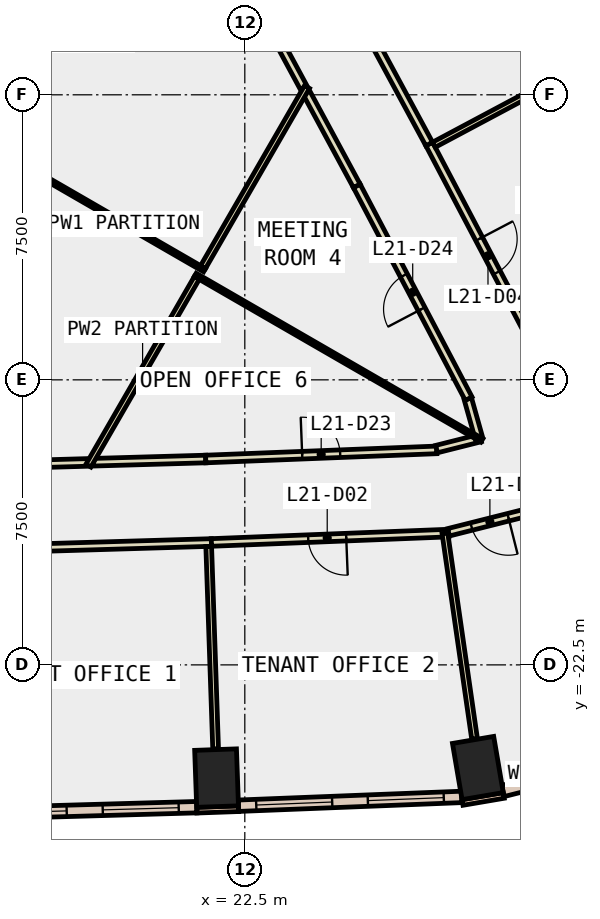
"""IFC4 building model, lengths in metres.
Left out: names, types, materials, properties, quantities, classifications, styles, units other than length and angle.
Written with IfcOpenShell. Run it as: python <this file> out.ifc"""

import sys

from ifc_helpers import new_model, si_unit, direction, frame, frame_2d, origin, origin_2d, place, context, subcontext, project, spatial, rectangle, extrude, element, fill, save


model = new_model("IFC4")
c1 = context("Model", 3, precision=1e-05, world=origin(), true_north=direction((0.0, 1.0)))
c2 = subcontext(c1, "Body", "Model", "MODEL_VIEW")
j1 = project(units=[si_unit("LENGTHUNIT", "METRE"), si_unit("PLANEANGLEUNIT", "RADIAN")], contexts=[c1])
p1 = place(None, origin())
s1 = spatial("IfcSite", under=j1, at=p1, CompositionType="ELEMENT")
p2 = place(p1, origin())
s2 = spatial("IfcBuilding", under=s1, at=p2, CompositionType="ELEMENT")
p3 = place(p2, frame((0.0, 0.0, 99.2)))
s3 = spatial("IfcBuildingStorey", under=s2, at=p3, CompositionType="ELEMENT", Elevation=99.2)
for number, where, z_axis, x_axis in (
    (1, (21.757, -25.479, -0.4), (0.0, 0.0, 1.0), (0.999, 0.035, 0.0)),
    (2, (28.633, -25.214, -0.4), (0.0, 0.0, 1.0), (0.986, 0.168, 0.0)),
):
    element("IfcColumn", number, at=place(p3, frame(where, z_axis=z_axis, x_axis=x_axis)), inside=s3, PredefinedType="COLUMN", context=c2, shape_type="SweptSolid", body=[
        extrude(rectangle(XDim=1.1, YDim=1.5, at=origin_2d()), origin(), (0.0, 0.0, 1.0), 4.2),
    ])
p4 = place(p3, frame((21.237, -26.323, 0.0), z_axis=(0.0, 0.0, 1.0), x_axis=(0.999368780235, 0.035525217693, 0.0)))
e3 = element("IfcWall", 3, at=p4, inside=s3, PredefinedType="STANDARD", context=c2, shape_type="SweptSolid", body=[
    extrude(rectangle(XDim=1.1, YDim=0.15, at=frame_2d((0.55, 0.0))), origin(), (0.0, 0.0, 1.0), 3.8),
])
p5 = place(p3, frame((28.229, -26.12, 0.0), z_axis=(0.0, 0.0, 1.0), x_axis=(0.985763338892, 0.168138751323, 0.0)))
e4 = element("IfcWall", 4, at=p5, inside=s3, PredefinedType="STANDARD", context=c2, shape_type="SweptSolid", body=[
    extrude(rectangle(XDim=1.101, YDim=0.15, at=frame_2d((0.55, 0.0))), origin(), (0.0, 0.0, 1.0), 3.8),
])
p6 = place(p3, frame((15.34, -26.413, 0.0), z_axis=(0.0, 0.0, 1.0), x_axis=(0.999588397616, 0.028688592709, 0.0)))
e5 = element("IfcWall", 5, at=p6, inside=s3, PredefinedType="STANDARD", context=c2, shape_type="SweptSolid", body=[
    extrude(rectangle(XDim=5.897, YDim=0.3, at=frame_2d((2.949, 0.0))), origin(), (0.0, 0.0, 1.0), 3.8),
])
p7 = place(p6, frame((0.474, 0.0, 0.9)))
e6 = element("IfcOpeningElement", 6, at=p7, cuts=e5, PredefinedType="OPENING", context=c2, shape_type="SweptSolid", body=[
    extrude(rectangle(XDim=2.0, YDim=2.6, at=frame_2d((1.0, 1.3))), frame((0.0, 0.16, 0.0), z_axis=(0.0, -1.0, 0.0), x_axis=(1.0, 0.0, 0.0)), (0.0, 0.0, 1.0), 0.32),
])
p8 = place(p6, frame((3.423, 0.0, 0.9)))
e7 = element("IfcOpeningElement", 7, at=p8, cuts=e5, PredefinedType="OPENING", context=c2, shape_type="SweptSolid", body=[
    extrude(rectangle(XDim=2.0, YDim=2.6, at=frame_2d((1.0, 1.3))), frame((0.0, 0.16, 0.0), z_axis=(0.0, -1.0, 0.0), x_axis=(1.0, 0.0, 0.0)), (0.0, 0.0, 1.0), 0.32),
])
p9 = place(p3, frame((22.332, -26.206, 0.0), z_axis=(0.0, 0.0, 1.0), x_axis=(0.99922113396, 0.039460428885, 0.0)))
e8 = element("IfcWall", 8, at=p9, inside=s3, PredefinedType="STANDARD", context=c2, shape_type="SweptSolid", body=[
    extrude(rectangle(XDim=5.878, YDim=0.3, at=frame_2d((2.939, 0.0))), origin(), (0.0, 0.0, 1.0), 3.8),
])
p10 = place(p9, frame((0.469, 0.0, 0.9)))
e9 = element("IfcOpeningElement", 9, at=p10, cuts=e8, PredefinedType="OPENING", context=c2, shape_type="SweptSolid", body=[
    extrude(rectangle(XDim=2.0, YDim=2.6, at=frame_2d((1.0, 1.3))), frame((0.0, 0.16, 0.0), z_axis=(0.0, -1.0, 0.0), x_axis=(1.0, 0.0, 0.0)), (0.0, 0.0, 1.0), 0.32),
])
p11 = place(p9, frame((3.408, 0.0, 0.9)))
e10 = element("IfcOpeningElement", 10, at=p11, cuts=e8, PredefinedType="OPENING", context=c2, shape_type="SweptSolid", body=[
    extrude(rectangle(XDim=2.0, YDim=2.6, at=frame_2d((1.0, 1.3))), frame((0.0, 0.16, 0.0), z_axis=(0.0, -1.0, 0.0), x_axis=(1.0, 0.0, 0.0)), (0.0, 0.0, 1.0), 0.32),
])
p12 = place(p3, frame((29.293, -25.818, 0.0), z_axis=(0.0, 0.0, 1.0), x_axis=(0.969658938481, 0.244461741432, 0.0)))
e11 = element("IfcWall", 11, at=p12, inside=s3, PredefinedType="STANDARD", context=c2, shape_type="SweptSolid", body=[
    extrude(rectangle(XDim=3.727, YDim=0.3, at=frame_2d((1.864, 0.0))), origin(), (0.0, 0.0, 1.0), 3.8),
])
p13 = place(p12, frame((1.164, 0.0, 0.9)))
e12 = element("IfcOpeningElement", 12, at=p13, cuts=e11, PredefinedType="OPENING", context=c2, shape_type="SweptSolid", body=[
    extrude(rectangle(XDim=1.4, YDim=2.6, at=frame_2d((0.7, 1.3))), frame((0.0, 0.16, 0.0), z_axis=(0.0, -1.0, 0.0), x_axis=(1.0, 0.0, 0.0)), (0.0, 0.0, 1.0), 0.32),
])
p14 = place(p3, frame((14.519, -17.283, 0.0), z_axis=(0.0, 0.0, 1.0), x_axis=(0.999591204998, 0.028590608419, 0.0)))
e13 = element("IfcWall", 13, at=p14, inside=s3, PredefinedType="PARTITIONING", context=c2, shape_type="SweptSolid", body=[
    extrude(rectangle(XDim=3.843, YDim=0.2, at=frame_2d((1.921, 0.0))), origin(), (0.0, 0.0, 1.0), 3.8),
])
p15 = place(p3, frame((24.051, -7.315, 0.0), z_axis=(0.0, 0.0, 1.0), x_axis=(-0.475308630647, 0.87981913234, 0.0)))
e14 = element("IfcWall", 14, at=p15, inside=s3, PredefinedType="PARTITIONING", context=c2, shape_type="SweptSolid", body=[
    extrude(rectangle(XDim=4.166, YDim=0.2, at=frame_2d((2.083, 0.0))), origin(), (0.0, 0.0, 1.0), 3.8),
])
p16 = place(p3, frame((18.509, -17.168, 0.0), z_axis=(0.0, 0.0, 1.0), x_axis=(0.999588854267, 0.028672677323, 0.0)))
e15 = element("IfcWall", 15, at=p16, inside=s3, PredefinedType="PARTITIONING", context=c2, shape_type="SweptSolid", body=[
    extrude(rectangle(XDim=2.963, YDim=0.2, at=frame_2d((1.481, 0.0))), origin(), (0.0, 0.0, 1.0), 3.8),
])
p17 = place(p3, frame((21.471, -17.083, 0.0), z_axis=(0.0, 0.0, 1.0), x_axis=(0.999221407079, 0.039453512338, 0.0)))
e16 = element("IfcWall", 16, at=p17, inside=s3, PredefinedType="PARTITIONING", context=c2, shape_type="SweptSolid", body=[
    extrude(rectangle(XDim=6.083, YDim=0.2, at=frame_2d((3.042, 0.0))), origin(), (0.0, 0.0, 1.0), 3.8),
])
p18 = place(p17, frame((2.541, 0.0, 0.0)))
e17 = element("IfcOpeningElement", 17, at=p18, cuts=e16, PredefinedType="OPENING", context=c2, shape_type="SweptSolid", body=[
    extrude(rectangle(XDim=1.0, YDim=2.1, at=frame_2d((0.5, 1.05))), frame((0.0, 0.11, 0.0), z_axis=(0.0, -1.0, 0.0), x_axis=(1.0, 0.0, 0.0)), (0.0, 0.0, 1.0), 0.22),
])
p19 = place(p3, frame((27.546, -16.822, 0.0), z_axis=(0.0, 0.0, 1.0), x_axis=(0.969694756333, 0.244319625777, 0.0)))
e18 = element("IfcWall", 18, at=p19, inside=s3, PredefinedType="PARTITIONING", context=c2, shape_type="SweptSolid", body=[
    extrude(rectangle(XDim=1.191, YDim=0.2, at=frame_2d((0.596, 0.0))), origin(), (0.0, 0.0, 1.0), 3.8),
])
p20 = place(p3, frame((28.662, -16.541, 0.0), z_axis=(0.0, 0.0, 1.0), x_axis=(-0.270771802087, 0.96264356394, 0.0)))
e19 = element("IfcWall", 19, at=p20, inside=s3, PredefinedType="PARTITIONING", context=c2, shape_type="SweptSolid", body=[
    extrude(rectangle(XDim=1.078, YDim=0.2, at=frame_2d((0.539, 0.0))), origin(), (0.0, 0.0, 1.0), 3.8),
])
p21 = place(p3, frame((28.39, -15.495, 0.0), z_axis=(0.0, 0.0, 1.0), x_axis=(-0.465367816287, 0.885117390838, 0.0)))
e20 = element("IfcWall", 20, at=p21, inside=s3, PredefinedType="PARTITIONING", context=c2, shape_type="SweptSolid", body=[
    extrude(rectangle(XDim=6.326, YDim=0.2, at=frame_2d((3.163, 0.0))), origin(), (0.0, 0.0, 1.0), 3.8),
])
p22 = place(p21, frame((2.663, 0.0, 0.0)))
e21 = element("IfcOpeningElement", 21, at=p22, cuts=e20, PredefinedType="OPENING", context=c2, shape_type="SweptSolid", body=[
    extrude(rectangle(XDim=1.0, YDim=2.1, at=frame_2d((0.5, 1.05))), frame((0.0, 0.11, 0.0), z_axis=(0.0, -1.0, 0.0), x_axis=(1.0, 0.0, 0.0)), (0.0, 0.0, 1.0), 0.22),
])
p23 = place(p3, frame((25.446, -9.896, 0.0), z_axis=(0.0, 0.0, 1.0), x_axis=(-0.475427182652, 0.879755076141, 0.0)))
e22 = element("IfcWall", 22, at=p23, inside=s3, PredefinedType="PARTITIONING", context=c2, shape_type="SweptSolid", body=[
    extrude(rectangle(XDim=2.785, YDim=0.2, at=frame_2d((1.393, 0.0))), origin(), (0.0, 0.0, 1.0), 3.8),
])
p24 = place(p3, frame((21.621, -19.28, 0.0), z_axis=(0.0, 0.0, 1.0), x_axis=(-0.999557957525, -0.029730280001, 0.0)))
e23 = element("IfcWall", 23, at=p24, inside=s3, PredefinedType="PARTITIONING", context=c2, shape_type="SweptSolid", body=[
    extrude(rectangle(XDim=13.927, YDim=0.2, at=frame_2d((6.964, 0.0))), origin(), (0.0, 0.0, 1.0), 3.8),
])
p25 = place(p24, frame((6.464, 0.0, 0.0)))
e24 = element("IfcOpeningElement", 24, at=p25, cuts=e23, PredefinedType="OPENING", context=c2, shape_type="SweptSolid", body=[
    extrude(rectangle(XDim=1.0, YDim=2.1, at=frame_2d((0.5, 1.05))), frame((0.0, 0.11, 0.0), z_axis=(0.0, -1.0, 0.0), x_axis=(1.0, 0.0, 0.0)), (0.0, 0.0, 1.0), 0.22),
])
p26 = place(p3, frame((27.865, -19.032, 0.0), z_axis=(0.0, 0.0, 1.0), x_axis=(-0.999218029978, -0.039538950003, 0.0)))
e25 = element("IfcWall", 25, at=p26, inside=s3, PredefinedType="PARTITIONING", context=c2, shape_type="SweptSolid", body=[
    extrude(rectangle(XDim=6.249, YDim=0.2, at=frame_2d((3.125, 0.0))), origin(), (0.0, 0.0, 1.0), 3.8),
])
p27 = place(p26, frame((2.699, 0.0, 0.0)))
e26 = element("IfcOpeningElement", 26, at=p27, cuts=e25, PredefinedType="OPENING", context=c2, shape_type="SweptSolid", body=[
    extrude(rectangle(XDim=1.0, YDim=2.1, at=frame_2d((0.5, 1.05))), frame((0.0, 0.11, 0.0), z_axis=(0.0, -1.0, 0.0), x_axis=(1.0, 0.0, 0.0)), (0.0, 0.0, 1.0), 0.22),
])
p28 = place(p3, frame((30.037, -18.463, 0.0), z_axis=(0.0, 0.0, 1.0), x_axis=(-0.969686214682, -0.244353524746, 0.0)))
e27 = element("IfcWall", 27, at=p28, inside=s3, PredefinedType="PARTITIONING", context=c2, shape_type="SweptSolid", body=[
    extrude(rectangle(XDim=2.243, YDim=0.2, at=frame_2d((1.122, 0.0))), origin(), (0.0, 0.0, 1.0), 3.8),
])
p29 = place(p28, frame((0.622, 0.0, 0.0)))
e28 = element("IfcOpeningElement", 28, at=p29, cuts=e27, PredefinedType="OPENING", context=c2, shape_type="SweptSolid", body=[
    extrude(rectangle(XDim=1.0, YDim=2.1, at=frame_2d((0.5, 1.05))), frame((0.0, 0.11, 0.0), z_axis=(0.0, -1.0, 0.0), x_axis=(1.0, 0.0, 0.0)), (0.0, 0.0, 1.0), 0.22),
])
p30 = place(p3, frame((27.353, -8.794, 0.0), z_axis=(0.0, 0.0, 1.0), x_axis=(0.465239168813, -0.885185017836, 0.0)))
e29 = element("IfcWall", 29, at=p30, inside=s3, PredefinedType="PARTITIONING", context=c2, shape_type="SweptSolid", body=[
    extrude(rectangle(XDim=6.646, YDim=0.2, at=frame_2d((3.323, 0.0))), origin(), (0.0, 0.0, 1.0), 3.8),
])
p31 = place(p30, frame((2.823, 0.0, 0.0)))
e30 = element("IfcOpeningElement", 30, at=p31, cuts=e29, PredefinedType="OPENING", context=c2, shape_type="SweptSolid", body=[
    extrude(rectangle(XDim=1.0, YDim=2.1, at=frame_2d((0.5, 1.05))), frame((0.0, 0.11, 0.0), z_axis=(0.0, -1.0, 0.0), x_axis=(1.0, 0.0, 0.0)), (0.0, 0.0, 1.0), 0.22),
])
p32 = place(p3, frame((24.0, -2.593, 0.0), z_axis=(0.0, 0.0, 1.0), x_axis=(0.475480817472, -0.879726089312, 0.0)))
e31 = element("IfcWall", 31, at=p32, inside=s3, PredefinedType="PARTITIONING", context=c2, shape_type="SweptSolid", body=[
    extrude(rectangle(XDim=7.05, YDim=0.2, at=frame_2d((3.525, 0.0))), origin(), (0.0, 0.0, 1.0), 3.8),
])
p33 = place(p32, frame((3.1, 0.0, 0.0)))
e32 = element("IfcOpeningElement", 32, at=p33, cuts=e31, PredefinedType="OPENING", context=c2, shape_type="SweptSolid", body=[
    extrude(rectangle(XDim=1.0, YDim=2.1, at=frame_2d((0.5, 1.05))), frame((0.0, 0.11, 0.0), z_axis=(0.0, -1.0, 0.0), x_axis=(1.0, 0.0, 0.0)), (0.0, 0.0, 1.0), 0.22),
])
p34 = place(p3, frame((18.503, 2.949, 0.0), z_axis=(0.0, 0.0, 1.0), x_axis=(-0.49997390151, -0.86604047123, 0.0)))
e33 = element("IfcWall", 33, at=p34, inside=s3, PredefinedType="PARTITIONING", context=c2, shape_type="SweptSolid", body=[
    extrude(rectangle(XDim=11.626, YDim=0.2, at=frame_2d((5.813, 0.0))), origin(), (0.0, 0.0, 1.0), 3.8),
])
p35 = place(p3, frame((17.219, -9.676, 0.0), z_axis=(0.0, 0.0, 1.0), x_axis=(0.86598459596, -0.500070674565, 0.0)))
e34 = element("IfcWall", 34, at=p35, inside=s3, PredefinedType="PARTITIONING", context=c2, shape_type="SweptSolid", body=[
    extrude(rectangle(XDim=4.875, YDim=0.1, at=frame_2d((2.438, 0.0))), origin(), (0.0, 0.0, 1.0), 3.8),
])
p36 = place(p3, frame((21.236, -12.319, 0.0), z_axis=(0.0, 0.0, 1.0), x_axis=(-0.500016488359, -0.866015884017, 0.0)))
e35 = element("IfcWall", 35, at=p36, inside=s3, PredefinedType="PARTITIONING", context=c2, shape_type="SweptSolid", body=[
    extrude(rectangle(XDim=5.702, YDim=0.15, at=frame_2d((2.851, 0.0))), origin(), (0.0, 0.0, 1.0), 3.8),
])
p37 = place(p3, frame((24.137, -7.294, 0.0), z_axis=(0.0, 0.0, 1.0), x_axis=(-0.500001804394, -0.866024362014, 0.0)))
e36 = element("IfcWall", 36, at=p37, inside=s3, PredefinedType="PARTITIONING", context=c2, shape_type="SweptSolid", body=[
    extrude(rectangle(XDim=5.472, YDim=0.15, at=frame_2d((2.736, 0.0))), origin(), (0.0, 0.0, 1.0), 3.8),
])
p38 = place(p3, frame((21.196, -12.238, 0.0), z_axis=(0.0, 0.0, 1.0), x_axis=(0.866023145199, -0.500003911965, 0.0)))
e37 = element("IfcWall", 37, at=p38, inside=s3, PredefinedType="PARTITIONING", context=c2, shape_type="SweptSolid", body=[
    extrude(rectangle(XDim=8.71, YDim=0.1, at=frame_2d((4.355, 0.0))), origin(), (0.0, 0.0, 1.0), 3.8),
])
p39 = place(p3, frame((21.55, -19.382, 0.0), z_axis=(0.0, 0.0, 1.0), x_axis=(0.034124666577, -0.999417583961, 0.0)))
e38 = element("IfcWall", 38, at=p39, inside=s3, PredefinedType="PARTITIONING", context=c2, shape_type="SweptSolid", body=[
    extrude(rectangle(XDim=5.33, YDim=0.15, at=frame_2d((2.665, 0.0))), origin(), (0.0, 0.0, 1.0), 3.8),
])
p40 = place(p3, frame((27.765, -19.036, 0.0), z_axis=(0.0, 0.0, 1.0), x_axis=(0.142827612329, -0.989747580526, 0.0)))
e39 = element("IfcWall", 39, at=p40, inside=s3, PredefinedType="PARTITIONING", context=c2, shape_type="SweptSolid", body=[
    extrude(rectangle(XDim=5.468, YDim=0.15, at=frame_2d((2.734, 0.0))), origin(), (0.0, 0.0, 1.0), 3.8),
])
p41 = place(p3, frame((27.476, -8.814, 0.0), z_axis=(0.0, 0.0, 1.0), x_axis=(0.882440424847, 0.47042416668, 0.0)))
e40 = element("IfcWall", 40, at=p41, inside=s3, PredefinedType="PARTITIONING", context=c2, shape_type="SweptSolid", body=[
    extrude(rectangle(XDim=5.329, YDim=0.15, at=frame_2d((2.665, 0.0))), origin(), (0.0, 0.0, 1.0), 3.8),
])
p42 = place(p7, origin())
e41 = element("IfcWindow", 41, at=p42, inside=s3, PartitioningType="SINGLE_PANEL", PredefinedType="WINDOW", context=c2, shape_type="SweptSolid", body=[
    extrude(rectangle(XDim=2.0, YDim=2.6, at=frame_2d((1.0, 1.3))), frame((0.0, 0.03, 0.0), z_axis=(0.0, -1.0, 0.0), x_axis=(1.0, 0.0, 0.0)), (0.0, 0.0, 1.0), 0.06),
])
fill(e6, e41)
p43 = place(p8, origin())
e42 = element("IfcWindow", 42, at=p43, inside=s3, PartitioningType="SINGLE_PANEL", PredefinedType="WINDOW", context=c2, shape_type="SweptSolid", body=[
    extrude(rectangle(XDim=2.0, YDim=2.6, at=frame_2d((1.0, 1.3))), frame((0.0, 0.03, 0.0), z_axis=(0.0, -1.0, 0.0), x_axis=(1.0, 0.0, 0.0)), (0.0, 0.0, 1.0), 0.06),
])
fill(e7, e42)
p44 = place(p10, origin())
e43 = element("IfcWindow", 43, at=p44, inside=s3, PartitioningType="SINGLE_PANEL", PredefinedType="WINDOW", context=c2, shape_type="SweptSolid", body=[
    extrude(rectangle(XDim=2.0, YDim=2.6, at=frame_2d((1.0, 1.3))), frame((0.0, 0.03, 0.0), z_axis=(0.0, -1.0, 0.0), x_axis=(1.0, 0.0, 0.0)), (0.0, 0.0, 1.0), 0.06),
])
fill(e9, e43)
p45 = place(p11, origin())
e44 = element("IfcWindow", 44, at=p45, inside=s3, PartitioningType="SINGLE_PANEL", PredefinedType="WINDOW", context=c2, shape_type="SweptSolid", body=[
    extrude(rectangle(XDim=2.0, YDim=2.6, at=frame_2d((1.0, 1.3))), frame((0.0, 0.03, 0.0), z_axis=(0.0, -1.0, 0.0), x_axis=(1.0, 0.0, 0.0)), (0.0, 0.0, 1.0), 0.06),
])
fill(e10, e44)
p46 = place(p27, origin())
e45 = element("IfcDoor", 45, at=p46, inside=s3, OperationType="SINGLE_SWING_LEFT", PredefinedType="DOOR", context=c2, shape_type="SweptSolid", body=[
    extrude(rectangle(XDim=1.0, YDim=2.1, at=frame_2d((0.5, 1.05))), frame((0.0, 0.025, 0.0), z_axis=(0.0, -1.0, 0.0), x_axis=(1.0, 0.0, 0.0)), (0.0, 0.0, 1.0), 0.05),
])
fill(e26, e45)
p47 = place(p29, origin())
e46 = element("IfcDoor", 46, at=p47, inside=s3, OperationType="SINGLE_SWING_LEFT", PredefinedType="DOOR", context=c2, shape_type="SweptSolid", body=[
    extrude(rectangle(XDim=1.0, YDim=2.1, at=frame_2d((0.5, 1.05))), frame((0.0, 0.025, 0.0), z_axis=(0.0, -1.0, 0.0), x_axis=(1.0, 0.0, 0.0)), (0.0, 0.0, 1.0), 0.05),
])
fill(e28, e46)
p48 = place(p31, origin())
e47 = element("IfcDoor", 47, at=p48, inside=s3, OperationType="SINGLE_SWING_LEFT", PredefinedType="DOOR", context=c2, shape_type="SweptSolid", body=[
    extrude(rectangle(XDim=1.0, YDim=2.1, at=frame_2d((0.5, 1.05))), frame((0.0, 0.025, 0.0), z_axis=(0.0, -1.0, 0.0), x_axis=(1.0, 0.0, 0.0)), (0.0, 0.0, 1.0), 0.05),
])
fill(e30, e47)
p49 = place(p18, origin())
e48 = element("IfcDoor", 48, at=p49, inside=s3, OperationType="SINGLE_SWING_LEFT", PredefinedType="DOOR", context=c2, shape_type="SweptSolid", body=[
    extrude(rectangle(XDim=1.0, YDim=2.1, at=frame_2d((0.5, 1.05))), frame((0.0, 0.025, 0.0), z_axis=(0.0, -1.0, 0.0), x_axis=(1.0, 0.0, 0.0)), (0.0, 0.0, 1.0), 0.05),
])
fill(e17, e48)
p50 = place(p22, origin())
e49 = element("IfcDoor", 49, at=p50, inside=s3, OperationType="SINGLE_SWING_LEFT", PredefinedType="DOOR", context=c2, shape_type="SweptSolid", body=[
    extrude(rectangle(XDim=1.0, YDim=2.1, at=frame_2d((0.5, 1.05))), frame((0.0, 0.025, 0.0), z_axis=(0.0, -1.0, 0.0), x_axis=(1.0, 0.0, 0.0)), (0.0, 0.0, 1.0), 0.05),
])
fill(e21, e49)
save(model, sys.argv[1])
